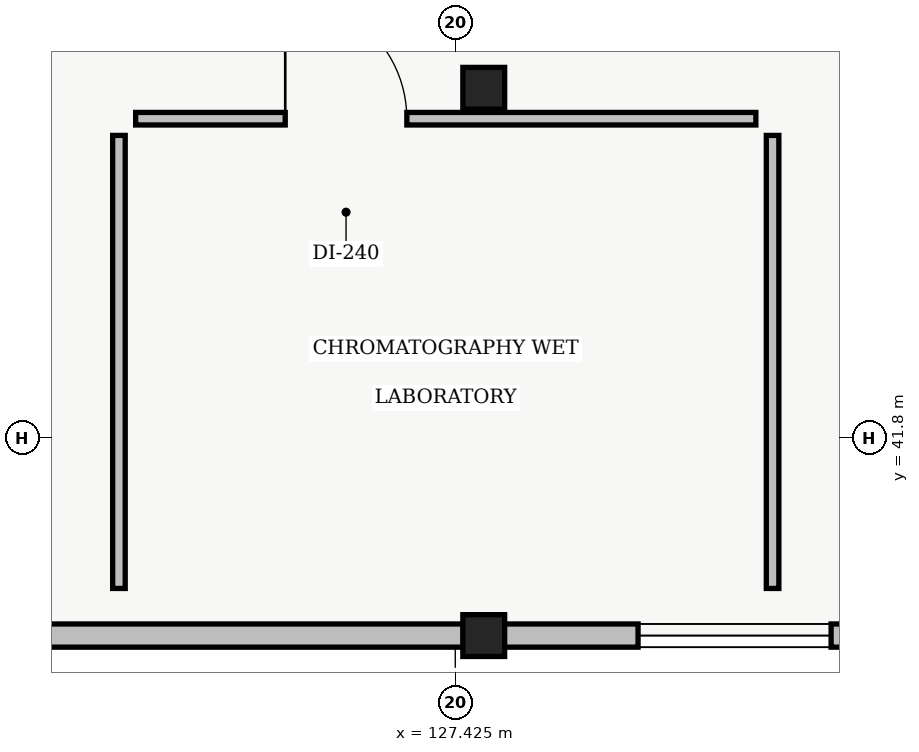
"""IFC4 building model, lengths in metres.
Left out: names, types, materials, properties, quantities, classifications, styles, units other than length and angle.
Written with IfcOpenShell. Run it as: python <this file> out.ifc"""

import sys

from ifc_helpers import new_model, si_unit, direction, frame, frame_2d, origin, origin_2d, place, context, subcontext, project, spatial, rectangle, extrude, element, fill, save


model = new_model("IFC4")
c1 = context("Model", 3, precision=1e-05, world=origin(), true_north=direction((0.0, 1.0)))
c2 = subcontext(c1, "Body", "Model", "MODEL_VIEW")
j1 = project(units=[si_unit("LENGTHUNIT", "METRE"), si_unit("PLANEANGLEUNIT", "RADIAN")], contexts=[c1])
p1 = place(None, origin())
s1 = spatial("IfcSite", under=j1, at=p1, CompositionType="ELEMENT")
p2 = place(p1, origin())
s2 = spatial("IfcBuilding", under=s1, at=p2, CompositionType="ELEMENT")
p3 = place(p2, frame((0.0, 0.0, 23.1)))
s3 = spatial("IfcBuildingStorey", under=s2, at=p3, CompositionType="ELEMENT", Elevation=23.1)
for number, where, z_axis, x_axis in (
    (1, (127.8, 39.2, 0.0), (0.0, 0.0, 1.0), (1.0, 0.0, 0.0)),
    (2, (127.8, 46.4, 0.0), (0.0, 0.0, 1.0), (1.0, 0.0, 0.0)),
):
    element("IfcColumn", number, at=place(p3, frame(where, z_axis=z_axis, x_axis=x_axis)), inside=s3, PredefinedType="COLUMN", context=c2, shape_type="SweptSolid", body=[
        extrude(rectangle(XDim=0.55, YDim=0.55, at=origin_2d()), origin(), (0.0, 0.0, 1.0), 4.29),
    ])
p4 = place(p3, frame((134.13, 39.2, 0.0), z_axis=(0.0, 0.0, 1.0), x_axis=(-1.0, 0.0, 0.0)))
e3 = element("IfcWall", 3, at=p4, inside=s3, PredefinedType="STANDARD", context=c2, shape_type="SweptSolid", body=[
    extrude(rectangle(XDim=6.06, YDim=0.305, at=frame_2d((3.03, 0.0))), origin(), (0.0, 0.0, 1.0), 3.775),
])
p5 = place(p4, frame((1.76, 0.0, 0.95)))
e4 = element("IfcOpeningElement", 4, at=p5, cuts=e3, PredefinedType="OPENING", context=c2, shape_type="SweptSolid", body=[
    extrude(rectangle(XDim=2.54, YDim=1.4, at=frame_2d((1.27, 0.7))), frame((0.0, 0.152, 0.0), z_axis=(0.0, -1.0, 0.0), x_axis=(1.0, 0.0, 0.0)), (0.0, 0.0, 1.0), 0.305),
])
p6 = place(p3, frame((127.53, 39.2, 0.0), z_axis=(0.0, 0.0, 1.0), x_axis=(-1.0, 0.0, 0.0)))
e5 = element("IfcWall", 5, at=p6, inside=s3, PredefinedType="STANDARD", context=c2, shape_type="SweptSolid", body=[
    extrude(rectangle(XDim=6.06, YDim=0.305, at=frame_2d((3.03, 0.0))), origin(), (0.0, 0.0, 1.0), 3.775),
])
p7 = place(p3, frame((131.6, 39.82, 0.0), z_axis=(0.0, 0.0, 1.0), x_axis=(0.0, 1.0, 0.0)))
e6 = element("IfcWall", 6, at=p7, inside=s3, PredefinedType="PARTITIONING", context=c2, shape_type="SweptSolid", body=[
    extrude(rectangle(XDim=5.96, YDim=0.165, at=frame_2d((2.98, 0.0))), origin(), (0.0, 0.0, 1.0), 3.95),
])
p8 = place(p3, frame((131.38, 46.0, 0.0), z_axis=(0.0, 0.0, 1.0), x_axis=(-1.0, 0.0, 0.0)))
e7 = element("IfcWall", 7, at=p8, inside=s3, PredefinedType="PARTITIONING", context=c2, shape_type="SweptSolid", body=[
    extrude(rectangle(XDim=8.16, YDim=0.165, at=frame_2d((4.08, 0.0))), origin(), (0.0, 0.0, 1.0), 3.95),
])
p9 = place(p8, frame((4.592, 0.0, 0.0)))
e8 = element("IfcOpeningElement", 8, at=p9, cuts=e7, PredefinedType="OPENING", context=c2, shape_type="SweptSolid", body=[
    extrude(rectangle(XDim=1.6, YDim=2.06, at=frame_2d((0.8, 1.03))), frame((0.0, 0.083, 0.0), z_axis=(0.0, -1.0, 0.0), x_axis=(1.0, 0.0, 0.0)), (0.0, 0.0, 1.0), 0.165),
])
p10 = place(p3, frame((123.0, 45.78, 0.0), z_axis=(0.0, 0.0, 1.0), x_axis=(0.0, -1.0, 0.0)))
e9 = element("IfcWall", 9, at=p10, inside=s3, PredefinedType="PARTITIONING", context=c2, shape_type="SweptSolid", body=[
    extrude(rectangle(XDim=5.96, YDim=0.165, at=frame_2d((2.98, 0.0))), origin(), (0.0, 0.0, 1.0), 3.95),
])
p11 = place(p5, origin())
e10 = element("IfcWindow", 10, at=p11, inside=s3, PartitioningType="SINGLE_PANEL", PredefinedType="WINDOW", context=c2, shape_type="SweptSolid", body=[
    extrude(rectangle(XDim=2.54, YDim=1.4, at=frame_2d((1.27, 0.7))), frame((0.0, 0.03, 0.0), z_axis=(0.0, -1.0, 0.0), x_axis=(1.0, 0.0, 0.0)), (0.0, 0.0, 1.0), 0.06),
])
fill(e4, e10)
p12 = place(p9, origin())
e11 = element("IfcDoor", 11, at=p12, inside=s3, OperationType="SINGLE_SWING_RIGHT", PredefinedType="DOOR", context=c2, shape_type="SweptSolid", body=[
    extrude(rectangle(XDim=1.6, YDim=2.06, at=frame_2d((0.8, 1.03))), frame((0.0, 0.025, 0.0), z_axis=(0.0, -1.0, 0.0), x_axis=(1.0, 0.0, 0.0)), (0.0, 0.0, 1.0), 0.05),
])
fill(e8, e11)
save(model, sys.argv[1])
